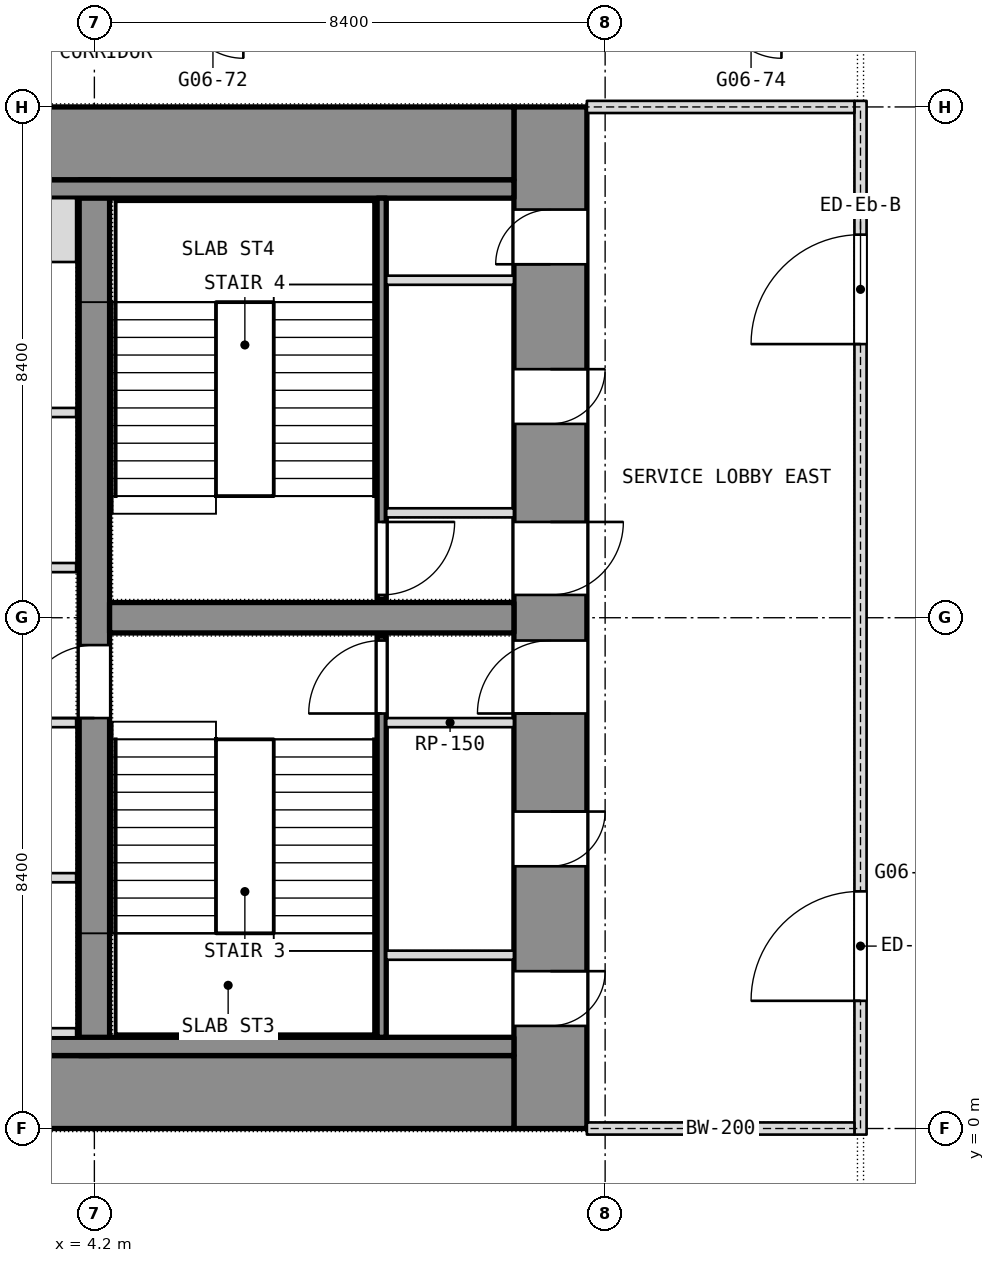
"""IFC4 building model, lengths in metres.
Left out: names, types, materials, properties, quantities, classifications, styles, units other than length and angle.
Written with IfcOpenShell. Run it as: python <this file> out.ifc"""

import sys

from ifc_helpers import new_model, si_unit, direction, frame, frame_2d, origin, place, context, subcontext, project, spatial, rectangle, extrude, element, fill, save


model = new_model("IFC4")
c1 = context("Model", 3, precision=1e-05, world=origin(), true_north=direction((0.0, 1.0)))
c2 = subcontext(c1, "Body", "Model", "MODEL_VIEW")
j1 = project(units=[si_unit("LENGTHUNIT", "METRE"), si_unit("PLANEANGLEUNIT", "RADIAN")], contexts=[c1])
p1 = place(None, origin())
s1 = spatial("IfcSite", under=j1, at=p1, CompositionType="ELEMENT")
p2 = place(p1, origin())
s2 = spatial("IfcBuilding", under=s1, at=p2, CompositionType="ELEMENT")
p3 = place(p2, frame((0.0, 0.0, 76.1)))
s3 = spatial("IfcBuildingStorey", under=s2, at=p3, CompositionType="ELEMENT", Elevation=76.1)
p4 = place(p3, frame((11.7, 0.0, 0.0), z_axis=(0.0, 0.0, 1.0), x_axis=(0.0, 1.0, 0.0)))
e1 = element("IfcWall", 1, at=p4, inside=s3, PredefinedType="SHEAR", context=c2, shape_type="SweptSolid", body=[
    extrude(rectangle(XDim=16.8, YDim=1.2, at=frame_2d((8.4, 0.0))), origin(), (0.0, 0.0, 1.0), 3.6),
])
p5 = place(p4, frame((1.688, 0.0, 0.0)))
e2 = element("IfcOpeningElement", 2, at=p5, cuts=e1, PredefinedType="OPENING", context=c2, shape_type="SweptSolid", body=[
    extrude(rectangle(XDim=0.9, YDim=2.1, at=frame_2d((0.45, 1.05))), frame((0.0, 0.6, 0.0), z_axis=(0.0, -1.0, 0.0), x_axis=(1.0, 0.0, 0.0)), (0.0, 0.0, 1.0), 1.2),
])
p6 = place(p4, frame((4.312, 0.0, 0.0)))
e3 = element("IfcOpeningElement", 3, at=p6, cuts=e1, PredefinedType="OPENING", context=c2, shape_type="SweptSolid", body=[
    extrude(rectangle(XDim=0.9, YDim=2.1, at=frame_2d((0.45, 1.05))), frame((0.0, 0.6, 0.0), z_axis=(0.0, -1.0, 0.0), x_axis=(1.0, 0.0, 0.0)), (0.0, 0.0, 1.0), 1.2),
])
p7 = place(p4, frame((6.825, 0.0, 0.0)))
e4 = element("IfcOpeningElement", 4, at=p7, cuts=e1, PredefinedType="OPENING", context=c2, shape_type="SweptSolid", body=[
    extrude(rectangle(XDim=1.2, YDim=2.1, at=frame_2d((0.6, 1.05))), frame((0.0, 0.6, 0.0), z_axis=(0.0, -1.0, 0.0), x_axis=(1.0, 0.0, 0.0)), (0.0, 0.0, 1.0), 1.2),
])
p8 = place(p4, frame((14.212, 0.0, 0.0)))
e5 = element("IfcOpeningElement", 5, at=p8, cuts=e1, PredefinedType="OPENING", context=c2, shape_type="SweptSolid", body=[
    extrude(rectangle(XDim=0.9, YDim=2.1, at=frame_2d((0.45, 1.05))), frame((0.0, 0.6, 0.0), z_axis=(0.0, -1.0, 0.0), x_axis=(1.0, 0.0, 0.0)), (0.0, 0.0, 1.0), 1.2),
])
p9 = place(p4, frame((11.587, 0.0, 0.0)))
e6 = element("IfcOpeningElement", 6, at=p9, cuts=e1, PredefinedType="OPENING", context=c2, shape_type="SweptSolid", body=[
    extrude(rectangle(XDim=0.9, YDim=2.1, at=frame_2d((0.45, 1.05))), frame((0.0, 0.6, 0.0), z_axis=(0.0, -1.0, 0.0), x_axis=(1.0, 0.0, 0.0)), (0.0, 0.0, 1.0), 1.2),
])
p10 = place(p4, frame((8.775, 0.0, 0.0)))
e7 = element("IfcOpeningElement", 7, at=p10, cuts=e1, PredefinedType="OPENING", context=c2, shape_type="SweptSolid", body=[
    extrude(rectangle(XDim=1.2, YDim=2.1, at=frame_2d((0.6, 1.05))), frame((0.0, 0.6, 0.0), z_axis=(0.0, -1.0, 0.0), x_axis=(1.0, 0.0, 0.0)), (0.0, 0.0, 1.0), 1.2),
])
for number, where, z_axis, x_axis in (
    (8, (-11.1, 0.6, 0.0), (0.0, 0.0, 1.0), (1.0, 0.0, 0.0)),
    (9, (-11.1, 16.2, 0.0), (0.0, 0.0, 1.0), (1.0, 0.0, 0.0)),
):
    element("IfcWall", number, at=place(p3, frame(where, z_axis=z_axis, x_axis=x_axis)), inside=s3, PredefinedType="SHEAR", context=c2, shape_type="SweptSolid", body=[
        extrude(rectangle(XDim=22.2, YDim=1.2, at=frame_2d((11.1, 0.0))), origin(), (0.0, 0.0, 1.0), 3.6),
    ])
p11 = place(p3, frame((4.2, 1.2, 0.0), z_axis=(0.0, 0.0, 1.0), x_axis=(0.0, 1.0, 0.0)))
e10 = element("IfcWall", 10, at=p11, inside=s3, PredefinedType="SHEAR", context=c2, shape_type="SweptSolid", body=[
    extrude(rectangle(XDim=14.4, YDim=0.5, at=frame_2d((7.2, 0.0))), origin(), (0.0, 0.0, 1.0), 3.6),
])
p12 = place(p11, frame((5.55, 0.0, 0.0)))
e11 = element("IfcOpeningElement", 11, at=p12, cuts=e10, PredefinedType="OPENING", context=c2, shape_type="SweptSolid", body=[
    extrude(rectangle(XDim=1.2, YDim=2.1, at=frame_2d((0.6, 1.05))), frame((0.0, 0.25, 0.0), z_axis=(0.0, -1.0, 0.0), x_axis=(1.0, 0.0, 0.0)), (0.0, 0.0, 1.0), 0.5),
])
p13 = place(p3, frame((4.45, 8.4, 0.0), z_axis=(0.0, 0.0, 1.0), x_axis=(1.0, 0.0, 0.0)))
e12 = element("IfcWall", 12, at=p13, inside=s3, PredefinedType="SHEAR", context=c2, shape_type="SweptSolid", body=[
    extrude(rectangle(XDim=6.65, YDim=0.5, at=frame_2d((3.325, 0.0))), origin(), (0.0, 0.0, 1.0), 3.6),
])
for number, where, z_axis, x_axis in (
    (13, (-11.1, 1.35, 0.0), (0.0, 0.0, 1.0), (1.0, 0.0, 0.0)),
    (14, (-11.1, 15.45, 0.0), (0.0, 0.0, 1.0), (1.0, 0.0, 0.0)),
):
    element("IfcWall", number, at=place(p3, frame(where, z_axis=z_axis, x_axis=x_axis)), inside=s3, PredefinedType="PARTITIONING", context=c2, shape_type="SweptSolid", body=[
        extrude(rectangle(XDim=22.2, YDim=0.3, at=frame_2d((11.1, 0.0))), origin(), (0.0, 0.0, 1.0), 3.34),
    ])
p14 = place(p3, frame((8.925, 1.5, 0.0), z_axis=(0.0, 0.0, 1.0), x_axis=(0.0, 1.0, 0.0)))
e15 = element("IfcWall", 15, at=p14, inside=s3, PredefinedType="SHEAR", context=c2, shape_type="SweptSolid", body=[
    extrude(rectangle(XDim=6.6, YDim=0.15, at=frame_2d((3.3, 0.0))), origin(), (0.0, 0.0, 1.0), 3.34),
])
p15 = place(p14, frame((5.325, 0.0, 0.0)))
e16 = element("IfcOpeningElement", 16, at=p15, cuts=e15, PredefinedType="OPENING", context=c2, shape_type="SweptSolid", body=[
    extrude(rectangle(XDim=1.2, YDim=2.1, at=frame_2d((0.6, 1.05))), frame((0.0, 0.075, 0.0), z_axis=(0.0, -1.0, 0.0), x_axis=(1.0, 0.0, 0.0)), (0.0, 0.0, 1.0), 0.15),
])
for number, where, z_axis, x_axis in (
    (17, (9.0, 6.675, 0.0), (0.0, 0.0, 1.0), (1.0, 0.0, 0.0)),
    (18, (9.0, 2.85, 0.0), (0.0, 0.0, 1.0), (1.0, 0.0, 0.0)),
):
    element("IfcWall", number, at=place(p3, frame(where, z_axis=z_axis, x_axis=x_axis)), inside=s3, PredefinedType="PARTITIONING", context=c2, shape_type="SweptSolid", body=[
        extrude(rectangle(XDim=2.1, YDim=0.15, at=frame_2d((1.05, 0.0))), origin(), (0.0, 0.0, 1.0), 3.34),
    ])
p16 = place(p3, frame((8.925, 8.7, 0.0), z_axis=(0.0, 0.0, 1.0), x_axis=(0.0, 1.0, 0.0)))
e19 = element("IfcWall", 19, at=p16, inside=s3, PredefinedType="SHEAR", context=c2, shape_type="SweptSolid", body=[
    extrude(rectangle(XDim=6.6, YDim=0.15, at=frame_2d((3.3, 0.0))), origin(), (0.0, 0.0, 1.0), 3.34),
])
p17 = place(p16, frame((0.075, 0.0, 0.0)))
e20 = element("IfcOpeningElement", 20, at=p17, cuts=e19, PredefinedType="OPENING", context=c2, shape_type="SweptSolid", body=[
    extrude(rectangle(XDim=1.2, YDim=2.1, at=frame_2d((0.6, 1.05))), frame((0.0, 0.075, 0.0), z_axis=(0.0, -1.0, 0.0), x_axis=(1.0, 0.0, 0.0)), (0.0, 0.0, 1.0), 0.15),
])
for number, where, z_axis, x_axis in (
    (21, (9.0, 10.125, 0.0), (0.0, 0.0, 1.0), (1.0, 0.0, 0.0)),
    (22, (9.0, 13.95, 0.0), (0.0, 0.0, 1.0), (1.0, 0.0, 0.0)),
):
    element("IfcWall", number, at=place(p3, frame(where, z_axis=z_axis, x_axis=x_axis)), inside=s3, PredefinedType="PARTITIONING", context=c2, shape_type="SweptSolid", body=[
        extrude(rectangle(XDim=2.1, YDim=0.15, at=frame_2d((1.05, 0.0))), origin(), (0.0, 0.0, 1.0), 3.34),
    ])
p18 = place(p3, frame((-3.9, 4.125, 0.0), z_axis=(0.0, 0.0, 1.0), x_axis=(1.0, 0.0, 0.0)))
e23 = element("IfcWall", 23, at=p18, inside=s3, PredefinedType="PARTITIONING", context=c2, shape_type="SweptSolid", body=[
    extrude(rectangle(XDim=7.8, YDim=0.15, at=frame_2d((3.9, 0.0))), origin(), (0.0, 0.0, 1.0), 3.34),
])
p19 = place(p18, frame((3.75, 0.0, 0.0)))
e24 = element("IfcOpeningElement", 24, at=p19, cuts=e23, PredefinedType="OPENING", context=c2, shape_type="SweptSolid", body=[
    extrude(rectangle(XDim=1.2, YDim=2.1, at=frame_2d((0.6, 1.05))), frame((0.0, 0.075, 0.0), z_axis=(0.0, -1.0, 0.0), x_axis=(1.0, 0.0, 0.0)), (0.0, 0.0, 1.0), 0.15),
])
p20 = place(p3, frame((-3.9, 11.775, 0.0), z_axis=(0.0, 0.0, 1.0), x_axis=(1.0, 0.0, 0.0)))
e25 = element("IfcWall", 25, at=p20, inside=s3, PredefinedType="PARTITIONING", context=c2, shape_type="SweptSolid", body=[
    extrude(rectangle(XDim=7.8, YDim=0.15, at=frame_2d((3.9, 0.0))), origin(), (0.0, 0.0, 1.0), 3.34),
])
p21 = place(p20, frame((3.3, 0.0, 0.0)))
e26 = element("IfcOpeningElement", 26, at=p21, cuts=e25, PredefinedType="OPENING", context=c2, shape_type="SweptSolid", body=[
    extrude(rectangle(XDim=1.2, YDim=2.1, at=frame_2d((0.6, 1.05))), frame((0.0, 0.075, 0.0), z_axis=(0.0, -1.0, 0.0), x_axis=(1.0, 0.0, 0.0)), (0.0, 0.0, 1.0), 0.15),
])
p22 = place(p3, frame((1.65, 1.575, 0.0), z_axis=(0.0, 0.0, 1.0), x_axis=(1.0, 0.0, 0.0)))
e27 = element("IfcWall", 27, at=p22, inside=s3, PredefinedType="SHEAR", context=c2, shape_type="SweptSolid", body=[
    extrude(rectangle(XDim=2.25, YDim=0.15, at=frame_2d((1.125, 0.0))), origin(), (0.0, 0.0, 1.0), 3.6),
])
p23 = place(p3, frame((1.65, 14.775, 0.0), z_axis=(0.0, 0.0, 1.0), x_axis=(1.0, 0.0, 0.0)))
e28 = element("IfcWall", 28, at=p23, inside=s3, PredefinedType="SHEAR", context=c2, shape_type="SweptSolid", body=[
    extrude(rectangle(XDim=2.25, YDim=1.05, at=frame_2d((1.125, 0.0))), origin(), (0.0, 0.0, 1.0), 3.6),
])
for number, where, z_axis, x_axis in (
    (29, (1.65, 6.675, 0.0), (0.0, 0.0, 1.0), (1.0, 0.0, 0.0)),
    (30, (1.65, 9.225, 0.0), (0.0, 0.0, 1.0), (1.0, 0.0, 0.0)),
):
    element("IfcWall", number, at=place(p3, frame(where, z_axis=z_axis, x_axis=x_axis)), inside=s3, PredefinedType="SHEAR", context=c2, shape_type="SweptSolid", body=[
        extrude(rectangle(XDim=2.25, YDim=0.15, at=frame_2d((1.125, 0.0))), origin(), (0.0, 0.0, 1.0), 3.6),
    ])
p24 = place(p3, frame((16.8, -0.1, 0.0), z_axis=(0.0, 0.0, 1.0), x_axis=(0.0, 1.0, 0.0)))
e31 = element("IfcWall", 31, at=p24, inside=s3, PredefinedType="PARTITIONING", context=c2, shape_type="SweptSolid", body=[
    extrude(rectangle(XDim=17.0, YDim=0.2, at=frame_2d((8.5, 0.0))), origin(), (0.0, 0.0, 1.0), 3.34),
])
p25 = place(p24, frame((2.2, 0.0, 0.0)))
e32 = element("IfcOpeningElement", 32, at=p25, cuts=e31, PredefinedType="OPENING", context=c2, shape_type="SweptSolid", body=[
    extrude(rectangle(XDim=1.8, YDim=2.1, at=frame_2d((0.9, 1.05))), frame((0.0, 0.1, 0.0), z_axis=(0.0, -1.0, 0.0), x_axis=(1.0, 0.0, 0.0)), (0.0, 0.0, 1.0), 0.2),
])
p26 = place(p24, frame((13.0, 0.0, 0.0)))
e33 = element("IfcOpeningElement", 33, at=p26, cuts=e31, PredefinedType="OPENING", context=c2, shape_type="SweptSolid", body=[
    extrude(rectangle(XDim=1.8, YDim=2.1, at=frame_2d((0.9, 1.05))), frame((0.0, 0.1, 0.0), z_axis=(0.0, -1.0, 0.0), x_axis=(1.0, 0.0, 0.0)), (0.0, 0.0, 1.0), 0.2),
])
for number, where, z_axis, x_axis in (
    (34, (12.3, 0.0, 0.0), (0.0, 0.0, 1.0), (1.0, 0.0, 0.0)),
    (35, (12.3, 16.8, 0.0), (0.0, 0.0, 1.0), (1.0, 0.0, 0.0)),
):
    element("IfcWall", number, at=place(p3, frame(where, z_axis=z_axis, x_axis=x_axis)), inside=s3, PredefinedType="PARTITIONING", context=c2, shape_type="SweptSolid", body=[
        extrude(rectangle(XDim=4.4, YDim=0.2, at=frame_2d((2.2, 0.0))), origin(), (0.0, 0.0, 1.0), 2.84),
    ])
p27 = place(p5, origin())
e36 = element("IfcDoor", 36, at=p27, inside=s3, OperationType="SINGLE_SWING_LEFT", PredefinedType="DOOR", context=c2, shape_type="SweptSolid", body=[
    extrude(rectangle(XDim=0.9, YDim=2.1, at=frame_2d((0.45, 1.05))), frame((0.0, 0.025, 0.0), z_axis=(0.0, -1.0, 0.0), x_axis=(1.0, 0.0, 0.0)), (0.0, 0.0, 1.0), 0.05),
])
fill(e2, e36)
p28 = place(p6, origin())
e37 = element("IfcDoor", 37, at=p28, inside=s3, OperationType="SINGLE_SWING_LEFT", PredefinedType="DOOR", context=c2, shape_type="SweptSolid", body=[
    extrude(rectangle(XDim=0.9, YDim=2.1, at=frame_2d((0.45, 1.05))), frame((0.0, 0.025, 0.0), z_axis=(0.0, -1.0, 0.0), x_axis=(1.0, 0.0, 0.0)), (0.0, 0.0, 1.0), 0.05),
])
fill(e3, e37)
p29 = place(p7, origin())
e38 = element("IfcDoor", 38, at=p29, inside=s3, OperationType="SINGLE_SWING_LEFT", PredefinedType="DOOR", context=c2, shape_type="SweptSolid", body=[
    extrude(rectangle(XDim=1.2, YDim=2.1, at=frame_2d((0.6, 1.05))), frame((0.0, 0.025, 0.0), z_axis=(0.0, -1.0, 0.0), x_axis=(1.0, 0.0, 0.0)), (0.0, 0.0, 1.0), 0.05),
])
fill(e4, e38)
p30 = place(p15, origin())
e39 = element("IfcDoor", 39, at=p30, inside=s3, OperationType="SINGLE_SWING_LEFT", PredefinedType="DOOR", context=c2, shape_type="SweptSolid", body=[
    extrude(rectangle(XDim=1.2, YDim=2.1, at=frame_2d((0.6, 1.05))), frame((0.0, 0.025, 0.0), z_axis=(0.0, -1.0, 0.0), x_axis=(1.0, 0.0, 0.0)), (0.0, 0.0, 1.0), 0.05),
])
fill(e16, e39)
p31 = place(p8, origin())
e40 = element("IfcDoor", 40, at=p31, inside=s3, OperationType="SINGLE_SWING_LEFT", PredefinedType="DOOR", context=c2, shape_type="SweptSolid", body=[
    extrude(rectangle(XDim=0.9, YDim=2.1, at=frame_2d((0.45, 1.05))), frame((0.0, 0.025, 0.0), z_axis=(0.0, -1.0, 0.0), x_axis=(1.0, 0.0, 0.0)), (0.0, 0.0, 1.0), 0.05),
])
fill(e5, e40)
p32 = place(p9, origin())
e41 = element("IfcDoor", 41, at=p32, inside=s3, OperationType="SINGLE_SWING_LEFT", PredefinedType="DOOR", context=c2, shape_type="SweptSolid", body=[
    extrude(rectangle(XDim=0.9, YDim=2.1, at=frame_2d((0.45, 1.05))), frame((0.0, 0.025, 0.0), z_axis=(0.0, -1.0, 0.0), x_axis=(1.0, 0.0, 0.0)), (0.0, 0.0, 1.0), 0.05),
])
fill(e6, e41)
p33 = place(p10, origin())
e42 = element("IfcDoor", 42, at=p33, inside=s3, OperationType="SINGLE_SWING_LEFT", PredefinedType="DOOR", context=c2, shape_type="SweptSolid", body=[
    extrude(rectangle(XDim=1.2, YDim=2.1, at=frame_2d((0.6, 1.05))), frame((0.0, 0.025, 0.0), z_axis=(0.0, -1.0, 0.0), x_axis=(1.0, 0.0, 0.0)), (0.0, 0.0, 1.0), 0.05),
])
fill(e7, e42)
p34 = place(p17, origin())
e43 = element("IfcDoor", 43, at=p34, inside=s3, OperationType="SINGLE_SWING_LEFT", PredefinedType="DOOR", context=c2, shape_type="SweptSolid", body=[
    extrude(rectangle(XDim=1.2, YDim=2.1, at=frame_2d((0.6, 1.05))), frame((0.0, 0.025, 0.0), z_axis=(0.0, -1.0, 0.0), x_axis=(1.0, 0.0, 0.0)), (0.0, 0.0, 1.0), 0.05),
])
fill(e20, e43)
p35 = place(p12, origin())
e44 = element("IfcDoor", 44, at=p35, inside=s3, OperationType="SINGLE_SWING_LEFT", PredefinedType="DOOR", context=c2, shape_type="SweptSolid", body=[
    extrude(rectangle(XDim=1.2, YDim=2.1, at=frame_2d((0.6, 1.05))), frame((0.0, 0.025, 0.0), z_axis=(0.0, -1.0, 0.0), x_axis=(1.0, 0.0, 0.0)), (0.0, 0.0, 1.0), 0.05),
])
fill(e11, e44)
p36 = place(p25, origin())
e45 = element("IfcDoor", 45, at=p36, inside=s3, OperationType="DOUBLE_DOOR_SINGLE_SWING", PredefinedType="DOOR", context=c2, shape_type="SweptSolid", body=[
    extrude(rectangle(XDim=1.8, YDim=2.1, at=frame_2d((0.9, 1.05))), frame((0.0, 0.025, 0.0), z_axis=(0.0, -1.0, 0.0), x_axis=(1.0, 0.0, 0.0)), (0.0, 0.0, 1.0), 0.05),
])
fill(e32, e45)
p37 = place(p26, origin())
e46 = element("IfcDoor", 46, at=p37, inside=s3, OperationType="DOUBLE_DOOR_SINGLE_SWING", PredefinedType="DOOR", context=c2, shape_type="SweptSolid", body=[
    extrude(rectangle(XDim=1.8, YDim=2.1, at=frame_2d((0.9, 1.05))), frame((0.0, 0.025, 0.0), z_axis=(0.0, -1.0, 0.0), x_axis=(1.0, 0.0, 0.0)), (0.0, 0.0, 1.0), 0.05),
])
fill(e33, e46)
save(model, sys.argv[1])
